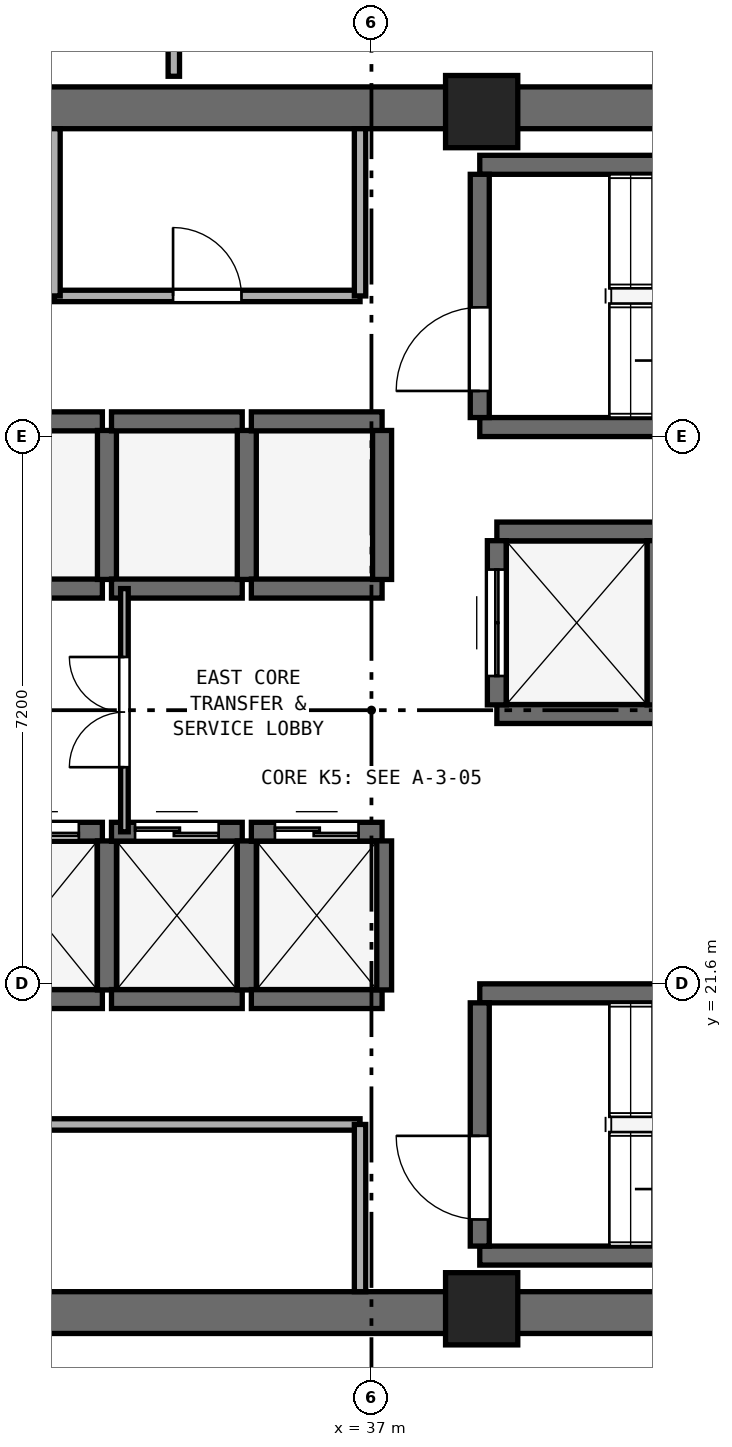
"""IFC4 building model, lengths in metres.
Left out: names, types, materials, properties, quantities, classifications, styles, units other than length and angle.
Written with IfcOpenShell. Run it as: python <this file> out.ifc"""

import sys

from ifc_helpers import new_model, si_unit, direction, frame, frame_2d, origin, origin_2d, place, context, subcontext, project, spatial, rectangle, extrude, element, fill, save


model = new_model("IFC4")
c1 = context("Model", 3, precision=1e-05, world=origin(), true_north=direction((0.0, 1.0)))
c2 = subcontext(c1, "Body", "Model", "MODEL_VIEW")
j1 = project(units=[si_unit("LENGTHUNIT", "METRE"), si_unit("PLANEANGLEUNIT", "RADIAN")], contexts=[c1])
p1 = place(None, origin())
s1 = spatial("IfcSite", under=j1, at=p1, CompositionType="ELEMENT")
p2 = place(p1, origin())
s2 = spatial("IfcBuilding", under=s1, at=p2, CompositionType="ELEMENT")
p3 = place(p2, frame((0.0, 0.0, 128.8)))
s3 = spatial("IfcBuildingStorey", under=s2, at=p3, CompositionType="ELEMENT", Elevation=128.8)
for number, where, z_axis, x_axis in (
    (1, (25.4, 17.275, 0.0), (0.0, 0.0, 1.0), (1.0, 0.0, 0.0)),
    (2, (25.4, 33.125, 0.0), (0.0, 0.0, 1.0), (1.0, 0.0, 0.0)),
):
    element("IfcWall", number, at=place(p3, frame(where, z_axis=z_axis, x_axis=x_axis)), inside=s3, PredefinedType="SHEAR", context=c2, shape_type="SweptSolid", body=[
        extrude(rectangle(XDim=23.2, YDim=0.55, at=frame_2d((11.6, 0.0))), origin(), (0.0, 0.0, 1.0), 3.54),
    ])
for number, where, z_axis, x_axis in (
    (3, (38.45, 17.325, 0.0), (0.0, 0.0, 1.0), (1.0, 0.0, 0.0)),
    (4, (38.45, 33.075, 0.0), (0.0, 0.0, 1.0), (1.0, 0.0, 0.0)),
):
    element("IfcColumn", number, at=place(p3, frame(where, z_axis=z_axis, x_axis=x_axis)), inside=s3, PredefinedType="PILASTER", context=c2, shape_type="SweptSolid", body=[
        extrude(rectangle(XDim=0.95, YDim=0.95, at=origin_2d()), origin(), (0.0, 0.0, 1.0), 3.8),
    ])
for number, where, z_axis, x_axis in (
    (5, (38.425, 28.925, 0.0), (0.0, 0.0, 1.0), (1.0, 0.0, 0.0)),
    (6, (38.425, 32.375, 0.0), (0.0, 0.0, 1.0), (1.0, 0.0, 0.0)),
):
    element("IfcWall", number, at=place(p3, frame(where, z_axis=z_axis, x_axis=x_axis)), inside=s3, PredefinedType="SHEAR", context=c2, shape_type="SweptSolid", body=[
        extrude(rectangle(XDim=7.3, YDim=0.25, at=frame_2d((3.65, 0.0))), origin(), (0.0, 0.0, 1.0), 3.54),
    ])
p4 = place(p3, frame((38.425, 29.05, 0.0), z_axis=(0.0, 0.0, 1.0), x_axis=(0.0, 1.0, 0.0)))
e7 = element("IfcWall", 7, at=p4, inside=s3, PredefinedType="SHEAR", context=c2, shape_type="SweptSolid", body=[
    extrude(rectangle(XDim=3.2, YDim=0.25, at=frame_2d((1.6, 0.0))), origin(), (0.0, 0.0, 1.0), 3.54),
])
p5 = place(p4, frame((0.35, 0.0, 0.0)))
e8 = element("IfcOpeningElement", 8, at=p5, cuts=e7, PredefinedType="OPENING", context=c2, shape_type="SweptSolid", body=[
    extrude(rectangle(XDim=1.1, YDim=2.15, at=frame_2d((0.55, 1.075))), frame((0.0, 0.135, 0.0), z_axis=(0.0, -1.0, 0.0), x_axis=(1.0, 0.0, 0.0)), (0.0, 0.0, 1.0), 0.27),
])
for number, where, z_axis, x_axis in (
    (9, (38.425, 18.025, 0.0), (0.0, 0.0, 1.0), (1.0, 0.0, 0.0)),
    (10, (38.425, 21.475, 0.0), (0.0, 0.0, 1.0), (1.0, 0.0, 0.0)),
):
    element("IfcWall", number, at=place(p3, frame(where, z_axis=z_axis, x_axis=x_axis)), inside=s3, PredefinedType="SHEAR", context=c2, shape_type="SweptSolid", body=[
        extrude(rectangle(XDim=7.3, YDim=0.25, at=frame_2d((3.65, 0.0))), origin(), (0.0, 0.0, 1.0), 3.54),
    ])
p6 = place(p3, frame((38.425, 18.15, 0.0), z_axis=(0.0, 0.0, 1.0), x_axis=(0.0, 1.0, 0.0)))
e11 = element("IfcWall", 11, at=p6, inside=s3, PredefinedType="SHEAR", context=c2, shape_type="SweptSolid", body=[
    extrude(rectangle(XDim=3.2, YDim=0.25, at=frame_2d((1.6, 0.0))), origin(), (0.0, 0.0, 1.0), 3.54),
])
p7 = place(p6, frame((0.35, 0.0, 0.0)))
e12 = element("IfcOpeningElement", 12, at=p7, cuts=e11, PredefinedType="OPENING", context=c2, shape_type="SweptSolid", body=[
    extrude(rectangle(XDim=1.1, YDim=2.15, at=frame_2d((0.55, 1.075))), frame((0.0, 0.135, 0.0), z_axis=(0.0, -1.0, 0.0), x_axis=(1.0, 0.0, 0.0)), (0.0, 0.0, 1.0), 0.27),
])
p8 = place(p3, frame((31.74, 21.4, 0.0), z_axis=(0.0, 0.0, 1.0), x_axis=(1.0, 0.0, 0.0)))
e13 = element("IfcWall", 13, at=p8, inside=s3, PredefinedType="SHEAR", context=c2, shape_type="SweptSolid", body=[
    extrude(rectangle(XDim=1.72, YDim=0.25, at=frame_2d((0.86, 0.0))), origin(), (0.0, 0.0, 1.0), 3.54),
])
p9 = place(p3, frame((31.74, 23.6, 0.0), z_axis=(0.0, 0.0, 1.0), x_axis=(1.0, 0.0, 0.0)))
e14 = element("IfcWall", 14, at=p9, inside=s3, PredefinedType="SHEAR", context=c2, shape_type="SweptSolid", body=[
    extrude(rectangle(XDim=1.72, YDim=0.25, at=frame_2d((0.86, 0.0))), origin(), (0.0, 0.0, 1.0), 3.54),
])
p10 = place(p9, frame((0.31, 0.0, 0.0)))
e15 = element("IfcOpeningElement", 15, at=p10, cuts=e14, PredefinedType="OPENING", context=c2, shape_type="SweptSolid", body=[
    extrude(rectangle(XDim=1.1, YDim=2.15, at=frame_2d((0.55, 1.075))), frame((0.0, 0.135, 0.0), z_axis=(0.0, -1.0, 0.0), x_axis=(1.0, 0.0, 0.0)), (0.0, 0.0, 1.0), 0.27),
])
p11 = place(p3, frame((33.52, 21.52, 0.0), z_axis=(0.0, 0.0, 1.0), x_axis=(0.0, 1.0, 0.0)))
e16 = element("IfcWall", 16, at=p11, inside=s3, PredefinedType="SHEAR", context=c2, shape_type="SweptSolid", body=[
    extrude(rectangle(XDim=1.96, YDim=0.25, at=frame_2d((0.98, 0.0))), origin(), (0.0, 0.0, 1.0), 3.54),
])
p12 = place(p3, frame((33.58, 21.4, 0.0), z_axis=(0.0, 0.0, 1.0), x_axis=(1.0, 0.0, 0.0)))
e17 = element("IfcWall", 17, at=p12, inside=s3, PredefinedType="SHEAR", context=c2, shape_type="SweptSolid", body=[
    extrude(rectangle(XDim=1.72, YDim=0.25, at=frame_2d((0.86, 0.0))), origin(), (0.0, 0.0, 1.0), 3.54),
])
p13 = place(p3, frame((33.58, 23.6, 0.0), z_axis=(0.0, 0.0, 1.0), x_axis=(1.0, 0.0, 0.0)))
e18 = element("IfcWall", 18, at=p13, inside=s3, PredefinedType="SHEAR", context=c2, shape_type="SweptSolid", body=[
    extrude(rectangle(XDim=1.72, YDim=0.25, at=frame_2d((0.86, 0.0))), origin(), (0.0, 0.0, 1.0), 3.54),
])
p14 = place(p13, frame((0.31, 0.0, 0.0)))
e19 = element("IfcOpeningElement", 19, at=p14, cuts=e18, PredefinedType="OPENING", context=c2, shape_type="SweptSolid", body=[
    extrude(rectangle(XDim=1.1, YDim=2.15, at=frame_2d((0.55, 1.075))), frame((0.0, 0.135, 0.0), z_axis=(0.0, -1.0, 0.0), x_axis=(1.0, 0.0, 0.0)), (0.0, 0.0, 1.0), 0.27),
])
p15 = place(p3, frame((35.36, 21.52, 0.0), z_axis=(0.0, 0.0, 1.0), x_axis=(0.0, 1.0, 0.0)))
e20 = element("IfcWall", 20, at=p15, inside=s3, PredefinedType="SHEAR", context=c2, shape_type="SweptSolid", body=[
    extrude(rectangle(XDim=1.96, YDim=0.25, at=frame_2d((0.98, 0.0))), origin(), (0.0, 0.0, 1.0), 3.54),
])
p16 = place(p3, frame((35.42, 21.4, 0.0), z_axis=(0.0, 0.0, 1.0), x_axis=(1.0, 0.0, 0.0)))
e21 = element("IfcWall", 21, at=p16, inside=s3, PredefinedType="SHEAR", context=c2, shape_type="SweptSolid", body=[
    extrude(rectangle(XDim=1.72, YDim=0.25, at=frame_2d((0.86, 0.0))), origin(), (0.0, 0.0, 1.0), 3.54),
])
p17 = place(p3, frame((35.42, 23.6, 0.0), z_axis=(0.0, 0.0, 1.0), x_axis=(1.0, 0.0, 0.0)))
e22 = element("IfcWall", 22, at=p17, inside=s3, PredefinedType="SHEAR", context=c2, shape_type="SweptSolid", body=[
    extrude(rectangle(XDim=1.72, YDim=0.25, at=frame_2d((0.86, 0.0))), origin(), (0.0, 0.0, 1.0), 3.54),
])
p18 = place(p17, frame((0.31, 0.0, 0.0)))
e23 = element("IfcOpeningElement", 23, at=p18, cuts=e22, PredefinedType="OPENING", context=c2, shape_type="SweptSolid", body=[
    extrude(rectangle(XDim=1.1, YDim=2.15, at=frame_2d((0.55, 1.075))), frame((0.0, 0.135, 0.0), z_axis=(0.0, -1.0, 0.0), x_axis=(1.0, 0.0, 0.0)), (0.0, 0.0, 1.0), 0.27),
])
p19 = place(p3, frame((37.14, 21.52, 0.0), z_axis=(0.0, 0.0, 1.0), x_axis=(0.0, 1.0, 0.0)))
e24 = element("IfcWall", 24, at=p19, inside=s3, PredefinedType="SHEAR", context=c2, shape_type="SweptSolid", body=[
    extrude(rectangle(XDim=1.96, YDim=0.25, at=frame_2d((0.98, 0.0))), origin(), (0.0, 0.0, 1.0), 3.54),
])
for number, where, z_axis, x_axis in (
    (25, (31.74, 26.8, 0.0), (0.0, 0.0, 1.0), (1.0, 0.0, 0.0)),
    (26, (31.74, 29.0, 0.0), (0.0, 0.0, 1.0), (1.0, 0.0, 0.0)),
):
    element("IfcWall", number, at=place(p3, frame(where, z_axis=z_axis, x_axis=x_axis)), inside=s3, PredefinedType="SHEAR", context=c2, shape_type="SweptSolid", body=[
        extrude(rectangle(XDim=1.72, YDim=0.25, at=frame_2d((0.86, 0.0))), origin(), (0.0, 0.0, 1.0), 3.54),
    ])
p20 = place(p3, frame((33.52, 26.92, 0.0), z_axis=(0.0, 0.0, 1.0), x_axis=(0.0, 1.0, 0.0)))
e27 = element("IfcWall", 27, at=p20, inside=s3, PredefinedType="SHEAR", context=c2, shape_type="SweptSolid", body=[
    extrude(rectangle(XDim=1.96, YDim=0.25, at=frame_2d((0.98, 0.0))), origin(), (0.0, 0.0, 1.0), 3.54),
])
for number, where, z_axis, x_axis in (
    (28, (33.58, 26.8, 0.0), (0.0, 0.0, 1.0), (1.0, 0.0, 0.0)),
    (29, (33.58, 29.0, 0.0), (0.0, 0.0, 1.0), (1.0, 0.0, 0.0)),
):
    element("IfcWall", number, at=place(p3, frame(where, z_axis=z_axis, x_axis=x_axis)), inside=s3, PredefinedType="SHEAR", context=c2, shape_type="SweptSolid", body=[
        extrude(rectangle(XDim=1.72, YDim=0.25, at=frame_2d((0.86, 0.0))), origin(), (0.0, 0.0, 1.0), 3.54),
    ])
p21 = place(p3, frame((35.36, 26.92, 0.0), z_axis=(0.0, 0.0, 1.0), x_axis=(0.0, 1.0, 0.0)))
e30 = element("IfcWall", 30, at=p21, inside=s3, PredefinedType="SHEAR", context=c2, shape_type="SweptSolid", body=[
    extrude(rectangle(XDim=1.96, YDim=0.25, at=frame_2d((0.98, 0.0))), origin(), (0.0, 0.0, 1.0), 3.54),
])
for number, where, z_axis, x_axis in (
    (31, (35.42, 26.8, 0.0), (0.0, 0.0, 1.0), (1.0, 0.0, 0.0)),
    (32, (35.42, 29.0, 0.0), (0.0, 0.0, 1.0), (1.0, 0.0, 0.0)),
):
    element("IfcWall", number, at=place(p3, frame(where, z_axis=z_axis, x_axis=x_axis)), inside=s3, PredefinedType="SHEAR", context=c2, shape_type="SweptSolid", body=[
        extrude(rectangle(XDim=1.72, YDim=0.25, at=frame_2d((0.86, 0.0))), origin(), (0.0, 0.0, 1.0), 3.54),
    ])
p22 = place(p3, frame((37.14, 26.92, 0.0), z_axis=(0.0, 0.0, 1.0), x_axis=(0.0, 1.0, 0.0)))
e33 = element("IfcWall", 33, at=p22, inside=s3, PredefinedType="SHEAR", context=c2, shape_type="SweptSolid", body=[
    extrude(rectangle(XDim=1.96, YDim=0.25, at=frame_2d((0.98, 0.0))), origin(), (0.0, 0.0, 1.0), 3.54),
])
for number, where, z_axis, x_axis in (
    (34, (38.65, 25.15, 0.0), (0.0, 0.0, 1.0), (1.0, 0.0, 0.0)),
    (35, (38.65, 27.55, 0.0), (0.0, 0.0, 1.0), (1.0, 0.0, 0.0)),
):
    element("IfcWall", number, at=place(p3, frame(where, z_axis=z_axis, x_axis=x_axis)), inside=s3, PredefinedType="SHEAR", context=c2, shape_type="SweptSolid", body=[
        extrude(rectangle(XDim=2.1, YDim=0.25, at=frame_2d((1.05, 0.0))), origin(), (0.0, 0.0, 1.0), 3.54),
    ])
p23 = place(p3, frame((38.65, 25.27, 0.0), z_axis=(0.0, 0.0, 1.0), x_axis=(0.0, 1.0, 0.0)))
e36 = element("IfcWall", 36, at=p23, inside=s3, PredefinedType="SHEAR", context=c2, shape_type="SweptSolid", body=[
    extrude(rectangle(XDim=2.16, YDim=0.25, at=frame_2d((1.08, 0.0))), origin(), (0.0, 0.0, 1.0), 3.54),
])
p24 = place(p23, frame((0.38, 0.0, 0.0)))
e37 = element("IfcOpeningElement", 37, at=p24, cuts=e36, PredefinedType="OPENING", context=c2, shape_type="SweptSolid", body=[
    extrude(rectangle(XDim=1.4, YDim=2.2, at=frame_2d((0.7, 1.1))), frame((0.0, 0.135, 0.0), z_axis=(0.0, -1.0, 0.0), x_axis=(1.0, 0.0, 0.0)), (0.0, 0.0, 1.0), 0.27),
])
p25 = place(p3, frame((40.75, 25.27, 0.0), z_axis=(0.0, 0.0, 1.0), x_axis=(0.0, 1.0, 0.0)))
e38 = element("IfcWall", 38, at=p25, inside=s3, PredefinedType="SHEAR", context=c2, shape_type="SweptSolid", body=[
    extrude(rectangle(XDim=2.16, YDim=0.25, at=frame_2d((1.08, 0.0))), origin(), (0.0, 0.0, 1.0), 3.54),
])
p26 = place(p3, frame((32.83, 30.65, 0.0), z_axis=(0.0, 0.0, 1.0), x_axis=(1.0, 0.0, 0.0)))
e39 = element("IfcWall", 39, at=p26, inside=s3, PredefinedType="PARTITIONING", context=c2, shape_type="SweptSolid", body=[
    extrude(rectangle(XDim=4.02, YDim=0.15, at=frame_2d((2.01, 0.0))), origin(), (0.0, 0.0, 1.0), 3.54),
])
p27 = place(p26, frame((1.56, 0.0, 0.0)))
e40 = element("IfcOpeningElement", 40, at=p27, cuts=e39, PredefinedType="OPENING", context=c2, shape_type="SweptSolid", body=[
    extrude(rectangle(XDim=0.9, YDim=2.1, at=frame_2d((0.45, 1.05))), frame((0.0, 0.085, 0.0), z_axis=(0.0, -1.0, 0.0), x_axis=(1.0, 0.0, 0.0)), (0.0, 0.0, 1.0), 0.17),
])
for number, where, z_axis, x_axis in (
    (41, (32.83, 30.65, 0.0), (0.0, 0.0, 1.0), (0.0, 1.0, 0.0)),
    (42, (36.85, 30.65, 0.0), (0.0, 0.0, 1.0), (0.0, 1.0, 0.0)),
):
    element("IfcWall", number, at=place(p3, frame(where, z_axis=z_axis, x_axis=x_axis)), inside=s3, PredefinedType="PARTITIONING", context=c2, shape_type="SweptSolid", body=[
        extrude(rectangle(XDim=2.2, YDim=0.15, at=frame_2d((1.1, 0.0))), origin(), (0.0, 0.0, 1.0), 3.54),
    ])
p28 = place(p3, frame((26.07, 19.75, 0.0), z_axis=(0.0, 0.0, 1.0), x_axis=(1.0, 0.0, 0.0)))
e43 = element("IfcWall", 43, at=p28, inside=s3, PredefinedType="PARTITIONING", context=c2, shape_type="SweptSolid", body=[
    extrude(rectangle(XDim=10.78, YDim=0.15, at=frame_2d((5.39, 0.0))), origin(), (0.0, 0.0, 1.0), 3.54),
])
p29 = place(p28, frame((4.915, 0.0, 0.0)))
e44 = element("IfcOpeningElement", 44, at=p29, cuts=e43, PredefinedType="OPENING", context=c2, shape_type="SweptSolid", body=[
    extrude(rectangle(XDim=0.95, YDim=2.1, at=frame_2d((0.475, 1.05))), frame((0.0, 0.085, 0.0), z_axis=(0.0, -1.0, 0.0), x_axis=(1.0, 0.0, 0.0)), (0.0, 0.0, 1.0), 0.17),
])
p30 = place(p3, frame((36.85, 17.55, 0.0), z_axis=(0.0, 0.0, 1.0), x_axis=(0.0, 1.0, 0.0)))
e45 = element("IfcWall", 45, at=p30, inside=s3, PredefinedType="PARTITIONING", context=c2, shape_type="SweptSolid", body=[
    extrude(rectangle(XDim=2.2, YDim=0.15, at=frame_2d((1.1, 0.0))), origin(), (0.0, 0.0, 1.0), 3.54),
])
p31 = place(p3, frame((33.75, 23.6, 0.0), z_axis=(0.0, 0.0, 1.0), x_axis=(0.0, 1.0, 0.0)))
e46 = element("IfcWall", 46, at=p31, inside=s3, PredefinedType="PARTITIONING", context=c2, shape_type="SweptSolid", body=[
    extrude(rectangle(XDim=3.2, YDim=0.1, at=frame_2d((1.6, 0.0))), origin(), (0.0, 0.0, 1.0), 3.54),
])
p32 = place(p31, frame((0.85, 0.0, 0.0)))
e47 = element("IfcOpeningElement", 47, at=p32, cuts=e46, PredefinedType="OPENING", context=c2, shape_type="SweptSolid", body=[
    extrude(rectangle(XDim=1.45, YDim=2.12, at=frame_2d((0.725, 1.06))), frame((0.0, 0.06, 0.0), z_axis=(0.0, -1.0, 0.0), x_axis=(1.0, 0.0, 0.0)), (0.0, 0.0, 1.0), 0.12),
])
p33 = place(p3, frame((34.4, 33.54, 0.0), z_axis=(0.0, 0.0, 1.0), x_axis=(0.0, 1.0, 0.0)))
e48 = element("IfcWall", 48, at=p33, inside=s3, PredefinedType="PARTITIONING", context=c2, shape_type="SweptSolid", body=[
    extrude(rectangle(XDim=2.41, YDim=0.15, at=frame_2d((1.205, 0.0))), origin(), (0.0, 0.0, 1.0), 3.54),
])
p34 = place(p5, origin())
e49 = element("IfcDoor", 49, at=p34, inside=s3, OperationType="SINGLE_SWING_LEFT", PredefinedType="DOOR", context=c2, shape_type="SweptSolid", body=[
    extrude(rectangle(XDim=1.1, YDim=2.15, at=frame_2d((0.55, 1.075))), frame((0.0, 0.025, 0.0), z_axis=(0.0, -1.0, 0.0), x_axis=(1.0, 0.0, 0.0)), (0.0, 0.0, 1.0), 0.05),
])
fill(e8, e49)
p35 = place(p7, origin())
e50 = element("IfcDoor", 50, at=p35, inside=s3, OperationType="SINGLE_SWING_RIGHT", PredefinedType="DOOR", context=c2, shape_type="SweptSolid", body=[
    extrude(rectangle(XDim=1.1, YDim=2.15, at=frame_2d((0.55, 1.075))), frame((0.0, 0.025, 0.0), z_axis=(0.0, -1.0, 0.0), x_axis=(1.0, 0.0, 0.0)), (0.0, 0.0, 1.0), 0.05),
])
fill(e12, e50)
p36 = place(p10, origin())
e51 = element("IfcDoor", 51, at=p36, inside=s3, OperationType="DOUBLE_DOOR_SLIDING", PredefinedType="DOOR", context=c2, shape_type="SweptSolid", body=[
    extrude(rectangle(XDim=1.1, YDim=2.15, at=frame_2d((0.55, 1.075))), frame((0.0, 0.025, 0.0), z_axis=(0.0, -1.0, 0.0), x_axis=(1.0, 0.0, 0.0)), (0.0, 0.0, 1.0), 0.05),
])
fill(e15, e51)
p37 = place(p14, origin())
e52 = element("IfcDoor", 52, at=p37, inside=s3, OperationType="DOUBLE_DOOR_SLIDING", PredefinedType="DOOR", context=c2, shape_type="SweptSolid", body=[
    extrude(rectangle(XDim=1.1, YDim=2.15, at=frame_2d((0.55, 1.075))), frame((0.0, 0.025, 0.0), z_axis=(0.0, -1.0, 0.0), x_axis=(1.0, 0.0, 0.0)), (0.0, 0.0, 1.0), 0.05),
])
fill(e19, e52)
p38 = place(p18, origin())
e53 = element("IfcDoor", 53, at=p38, inside=s3, OperationType="DOUBLE_DOOR_SLIDING", PredefinedType="DOOR", context=c2, shape_type="SweptSolid", body=[
    extrude(rectangle(XDim=1.1, YDim=2.15, at=frame_2d((0.55, 1.075))), frame((0.0, 0.025, 0.0), z_axis=(0.0, -1.0, 0.0), x_axis=(1.0, 0.0, 0.0)), (0.0, 0.0, 1.0), 0.05),
])
fill(e23, e53)
p39 = place(p24, origin())
e54 = element("IfcDoor", 54, at=p39, inside=s3, OperationType="DOUBLE_DOOR_SLIDING", PredefinedType="DOOR", context=c2, shape_type="SweptSolid", body=[
    extrude(rectangle(XDim=1.4, YDim=2.2, at=frame_2d((0.7, 1.1))), frame((0.0, 0.025, 0.0), z_axis=(0.0, -1.0, 0.0), x_axis=(1.0, 0.0, 0.0)), (0.0, 0.0, 1.0), 0.05),
])
fill(e37, e54)
p40 = place(p27, origin())
e55 = element("IfcDoor", 55, at=p40, inside=s3, OperationType="SINGLE_SWING_LEFT", PredefinedType="DOOR", context=c2, shape_type="SweptSolid", body=[
    extrude(rectangle(XDim=0.9, YDim=2.1, at=frame_2d((0.45, 1.05))), frame((0.0, 0.025, 0.0), z_axis=(0.0, -1.0, 0.0), x_axis=(1.0, 0.0, 0.0)), (0.0, 0.0, 1.0), 0.05),
])
fill(e40, e55)
p41 = place(p32, origin())
e56 = element("IfcDoor", 56, at=p41, inside=s3, OperationType="DOUBLE_DOOR_SINGLE_SWING", PredefinedType="DOOR", context=c2, shape_type="SweptSolid", body=[
    extrude(rectangle(XDim=1.45, YDim=2.12, at=frame_2d((0.725, 1.06))), frame((0.0, 0.025, 0.0), z_axis=(0.0, -1.0, 0.0), x_axis=(1.0, 0.0, 0.0)), (0.0, 0.0, 1.0), 0.05),
])
fill(e47, e56)
save(model, sys.argv[1])
